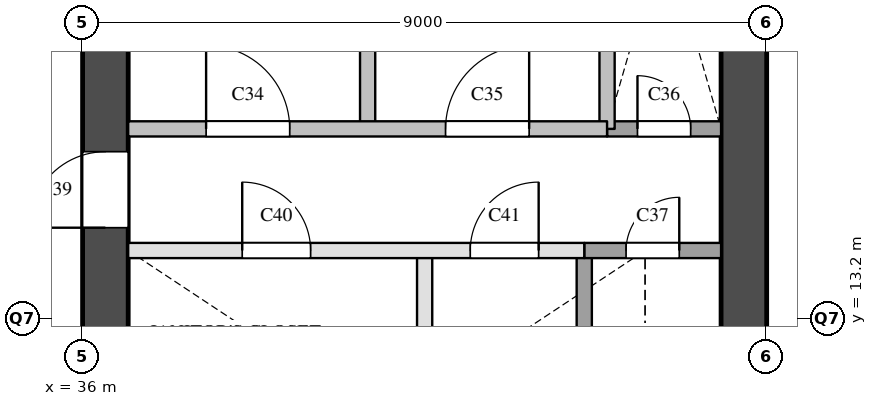
"""IFC4 building model, lengths in metres.
Left out: names, types, materials, properties, quantities, classifications, styles, units other than length and angle.
Written with IfcOpenShell. Run it as: python <this file> out.ifc"""

import sys

from ifc_helpers import new_model, si_unit, direction, frame, frame_2d, origin, place, context, subcontext, project, spatial, rectangle, extrude, element, fill, save


model = new_model("IFC4")
c1 = context("Model", 3, precision=1e-05, world=origin(), true_north=direction((0.0, 1.0)))
c2 = subcontext(c1, "Body", "Model", "MODEL_VIEW")
j1 = project(units=[si_unit("LENGTHUNIT", "METRE"), si_unit("PLANEANGLEUNIT", "RADIAN")], contexts=[c1])
p1 = place(None, origin())
s1 = spatial("IfcSite", under=j1, at=p1, CompositionType="ELEMENT")
p2 = place(p1, origin())
s2 = spatial("IfcBuilding", under=s1, at=p2, CompositionType="ELEMENT")
p3 = place(p2, frame((0.0, 0.0, 112.0)))
s3 = spatial("IfcBuildingStorey", under=s2, at=p3, CompositionType="ELEMENT", Elevation=112.0)
p4 = place(p3, frame((36.3, 9.6, 0.0), z_axis=(0.0, 0.0, 1.0), x_axis=(0.0, 1.0, 0.0)))
e1 = element("IfcWall", 1, at=p4, inside=s3, PredefinedType="SHEAR", context=c2, shape_type="SweptSolid", body=[
    extrude(rectangle(XDim=12.3, YDim=0.6, at=frame_2d((6.15, 0.0))), origin(), (0.0, 0.0, 1.0), 3.5),
])
p5 = place(p4, frame((0.525, 0.0, 0.0)))
e2 = element("IfcOpeningElement", 2, at=p5, cuts=e1, PredefinedType="OPENING", context=c2, shape_type="SweptSolid", body=[
    extrude(rectangle(XDim=1.2, YDim=2.1, at=frame_2d((0.6, 1.05))), frame((0.0, 0.31, 0.0), z_axis=(0.0, -1.0, 0.0), x_axis=(1.0, 0.0, 0.0)), (0.0, 0.0, 1.0), 0.62),
])
p6 = place(p4, frame((4.8, 0.0, 0.0)))
e3 = element("IfcOpeningElement", 3, at=p6, cuts=e1, PredefinedType="OPENING", context=c2, shape_type="SweptSolid", body=[
    extrude(rectangle(XDim=1.0, YDim=2.1, at=frame_2d((0.5, 1.05))), frame((0.0, 0.31, 0.0), z_axis=(0.0, -1.0, 0.0), x_axis=(1.0, 0.0, 0.0)), (0.0, 0.0, 1.0), 0.62),
])
p7 = place(p3, frame((44.7, 9.6, 0.0), z_axis=(0.0, 0.0, 1.0), x_axis=(0.0, 1.0, 0.0)))
e4 = element("IfcWall", 4, at=p7, inside=s3, PredefinedType="SHEAR", context=c2, shape_type="SweptSolid", body=[
    extrude(rectangle(XDim=12.3, YDim=0.6, at=frame_2d((6.15, 0.0))), origin(), (0.0, 0.0, 1.0), 3.5),
])
p8 = place(p7, frame((0.8, 0.0, 0.0)))
e5 = element("IfcOpeningElement", 5, at=p8, cuts=e4, PredefinedType="OPENING", context=c2, shape_type="SweptSolid", body=[
    extrude(rectangle(XDim=0.7, YDim=2.1, at=frame_2d((0.35, 1.05))), frame((0.0, 0.31, 0.0), z_axis=(0.0, -1.0, 0.0), x_axis=(1.0, 0.0, 0.0)), (0.0, 0.0, 1.0), 0.62),
])
p9 = place(p3, frame((39.75, 15.7, 0.0), z_axis=(0.0, 0.0, 1.0), x_axis=(0.0, 1.0, 0.0)))
e6 = element("IfcWall", 6, at=p9, inside=s3, PredefinedType="SOLIDWALL", context=c2, shape_type="SweptSolid", body=[
    extrude(rectangle(XDim=4.3, YDim=0.2, at=frame_2d((2.15, 0.0))), origin(), (0.0, 0.0, 1.0), 3.5),
])
p10 = place(p3, frame((40.5, 11.9, 0.0), z_axis=(0.0, 0.0, 1.0), x_axis=(0.0, 1.0, 0.0)))
e7 = element("IfcWall", 7, at=p10, inside=s3, PredefinedType="PARTITIONING", context=c2, shape_type="SweptSolid", body=[
    extrude(rectangle(XDim=2.2, YDim=0.2, at=frame_2d((1.1, 0.0))), origin(), (0.0, 0.0, 1.0), 3.5),
])
p11 = place(p3, frame((42.6, 11.9, 0.0), z_axis=(0.0, 0.0, 1.0), x_axis=(0.0, 1.0, 0.0)))
e8 = element("IfcWall", 8, at=p11, inside=s3, PredefinedType="SOLIDWALL", context=c2, shape_type="SweptSolid", body=[
    extrude(rectangle(XDim=2.2, YDim=0.2, at=frame_2d((1.1, 0.0))), origin(), (0.0, 0.0, 1.0), 3.5),
])
p12 = place(p3, frame((42.9, 15.7, 0.0), z_axis=(0.0, 0.0, 1.0), x_axis=(0.0, 1.0, 0.0)))
e9 = element("IfcWall", 9, at=p12, inside=s3, PredefinedType="SOLIDWALL", context=c2, shape_type="SweptSolid", body=[
    extrude(rectangle(XDim=4.3, YDim=0.2, at=frame_2d((2.15, 0.0))), origin(), (0.0, 0.0, 1.0), 3.5),
])
p13 = place(p3, frame((36.6, 14.1, 0.0), z_axis=(0.0, 0.0, 1.0), x_axis=(1.0, 0.0, 0.0)))
e10 = element("IfcWall", 10, at=p13, inside=s3, PredefinedType="PARTITIONING", context=c2, shape_type="SweptSolid", body=[
    extrude(rectangle(XDim=6.0, YDim=0.2, at=frame_2d((3.0, 0.0))), origin(), (0.0, 0.0, 1.0), 3.5),
])
p14 = place(p13, frame((1.5, 0.0, 0.0)))
e11 = element("IfcOpeningElement", 11, at=p14, cuts=e10, PredefinedType="OPENING", context=c2, shape_type="SweptSolid", body=[
    extrude(rectangle(XDim=0.9, YDim=2.1, at=frame_2d((0.45, 1.05))), frame((0.0, 0.11, 0.0), z_axis=(0.0, -1.0, 0.0), x_axis=(1.0, 0.0, 0.0)), (0.0, 0.0, 1.0), 0.22),
])
p15 = place(p13, frame((4.5, 0.0, 0.0)))
e12 = element("IfcOpeningElement", 12, at=p15, cuts=e10, PredefinedType="OPENING", context=c2, shape_type="SweptSolid", body=[
    extrude(rectangle(XDim=0.9, YDim=2.1, at=frame_2d((0.45, 1.05))), frame((0.0, 0.11, 0.0), z_axis=(0.0, -1.0, 0.0), x_axis=(1.0, 0.0, 0.0)), (0.0, 0.0, 1.0), 0.22),
])
p16 = place(p3, frame((42.6, 14.1, 0.0), z_axis=(0.0, 0.0, 1.0), x_axis=(1.0, 0.0, 0.0)))
e13 = element("IfcWall", 13, at=p16, inside=s3, PredefinedType="SOLIDWALL", context=c2, shape_type="SweptSolid", body=[
    extrude(rectangle(XDim=1.8, YDim=0.2, at=frame_2d((0.9, 0.0))), origin(), (0.0, 0.0, 1.0), 3.5),
])
p17 = place(p16, frame((0.55, 0.0, 0.0)))
e14 = element("IfcOpeningElement", 14, at=p17, cuts=e13, PredefinedType="OPENING", context=c2, shape_type="SweptSolid", body=[
    extrude(rectangle(XDim=0.7, YDim=2.1, at=frame_2d((0.35, 1.05))), frame((0.0, 0.11, 0.0), z_axis=(0.0, -1.0, 0.0), x_axis=(1.0, 0.0, 0.0)), (0.0, 0.0, 1.0), 0.22),
])
p18 = place(p3, frame((42.9, 15.7, 0.0), z_axis=(0.0, 0.0, 1.0), x_axis=(1.0, 0.0, 0.0)))
e15 = element("IfcWall", 15, at=p18, inside=s3, PredefinedType="SOLIDWALL", context=c2, shape_type="SweptSolid", body=[
    extrude(rectangle(XDim=1.5, YDim=0.2, at=frame_2d((0.75, 0.0))), origin(), (0.0, 0.0, 1.0), 3.5),
])
p19 = place(p18, frame((0.4, 0.0, 0.0)))
e16 = element("IfcOpeningElement", 16, at=p19, cuts=e15, PredefinedType="OPENING", context=c2, shape_type="SweptSolid", body=[
    extrude(rectangle(XDim=0.7, YDim=2.1, at=frame_2d((0.35, 1.05))), frame((0.0, 0.11, 0.0), z_axis=(0.0, -1.0, 0.0), x_axis=(1.0, 0.0, 0.0)), (0.0, 0.0, 1.0), 0.22),
])
p20 = place(p3, frame((36.6, 15.7, 0.0), z_axis=(0.0, 0.0, 1.0), x_axis=(1.0, 0.0, 0.0)))
e17 = element("IfcWall", 17, at=p20, inside=s3, PredefinedType="SOLIDWALL", context=c2, shape_type="SweptSolid", body=[
    extrude(rectangle(XDim=6.3, YDim=0.2, at=frame_2d((3.15, 0.0))), origin(), (0.0, 0.0, 1.0), 3.5),
])
p21 = place(p20, frame((1.025, 0.0, 0.0)))
e18 = element("IfcOpeningElement", 18, at=p21, cuts=e17, PredefinedType="OPENING", context=c2, shape_type="SweptSolid", body=[
    extrude(rectangle(XDim=1.1, YDim=2.1, at=frame_2d((0.55, 1.05))), frame((0.0, 0.11, 0.0), z_axis=(0.0, -1.0, 0.0), x_axis=(1.0, 0.0, 0.0)), (0.0, 0.0, 1.0), 0.22),
])
p22 = place(p20, frame((4.175, 0.0, 0.0)))
e19 = element("IfcOpeningElement", 19, at=p22, cuts=e17, PredefinedType="OPENING", context=c2, shape_type="SweptSolid", body=[
    extrude(rectangle(XDim=1.1, YDim=2.1, at=frame_2d((0.55, 1.05))), frame((0.0, 0.11, 0.0), z_axis=(0.0, -1.0, 0.0), x_axis=(1.0, 0.0, 0.0)), (0.0, 0.0, 1.0), 0.22),
])
p23 = place(p21, origin())
e20 = element("IfcDoor", 20, at=p23, inside=s3, OperationType="SINGLE_SWING_LEFT", PredefinedType="DOOR", context=c2, shape_type="SweptSolid", body=[
    extrude(rectangle(XDim=1.1, YDim=2.1, at=frame_2d((0.55, 1.05))), frame((0.0, 0.025, 0.0), z_axis=(0.0, -1.0, 0.0), x_axis=(1.0, 0.0, 0.0)), (0.0, 0.0, 1.0), 0.05),
])
fill(e18, e20)
p24 = place(p22, origin())
e21 = element("IfcDoor", 21, at=p24, inside=s3, OperationType="SINGLE_SWING_RIGHT", PredefinedType="DOOR", context=c2, shape_type="SweptSolid", body=[
    extrude(rectangle(XDim=1.1, YDim=2.1, at=frame_2d((0.55, 1.05))), frame((0.0, 0.025, 0.0), z_axis=(0.0, -1.0, 0.0), x_axis=(1.0, 0.0, 0.0)), (0.0, 0.0, 1.0), 0.05),
])
fill(e19, e21)
p25 = place(p19, origin())
e22 = element("IfcDoor", 22, at=p25, inside=s3, OperationType="SINGLE_SWING_LEFT", PredefinedType="DOOR", context=c2, shape_type="SweptSolid", body=[
    extrude(rectangle(XDim=0.7, YDim=2.1, at=frame_2d((0.35, 1.05))), frame((0.0, 0.025, 0.0), z_axis=(0.0, -1.0, 0.0), x_axis=(1.0, 0.0, 0.0)), (0.0, 0.0, 1.0), 0.05),
])
fill(e16, e22)
p26 = place(p17, origin())
e23 = element("IfcDoor", 23, at=p26, inside=s3, OperationType="SINGLE_SWING_RIGHT", PredefinedType="DOOR", context=c2, shape_type="SweptSolid", body=[
    extrude(rectangle(XDim=0.7, YDim=2.1, at=frame_2d((0.35, 1.05))), frame((0.0, 0.025, 0.0), z_axis=(0.0, -1.0, 0.0), x_axis=(1.0, 0.0, 0.0)), (0.0, 0.0, 1.0), 0.05),
])
fill(e14, e23)
p27 = place(p6, origin())
e24 = element("IfcDoor", 24, at=p27, inside=s3, OperationType="SINGLE_SWING_LEFT", PredefinedType="DOOR", context=c2, shape_type="SweptSolid", body=[
    extrude(rectangle(XDim=1.0, YDim=2.1, at=frame_2d((0.5, 1.05))), frame((0.0, 0.025, 0.0), z_axis=(0.0, -1.0, 0.0), x_axis=(1.0, 0.0, 0.0)), (0.0, 0.0, 1.0), 0.05),
])
fill(e3, e24)
p28 = place(p14, origin())
e25 = element("IfcDoor", 25, at=p28, inside=s3, OperationType="SINGLE_SWING_LEFT", PredefinedType="DOOR", context=c2, shape_type="SweptSolid", body=[
    extrude(rectangle(XDim=0.9, YDim=2.1, at=frame_2d((0.45, 1.05))), frame((0.0, 0.025, 0.0), z_axis=(0.0, -1.0, 0.0), x_axis=(1.0, 0.0, 0.0)), (0.0, 0.0, 1.0), 0.05),
])
fill(e11, e25)
p29 = place(p15, origin())
e26 = element("IfcDoor", 26, at=p29, inside=s3, OperationType="SINGLE_SWING_RIGHT", PredefinedType="DOOR", context=c2, shape_type="SweptSolid", body=[
    extrude(rectangle(XDim=0.9, YDim=2.1, at=frame_2d((0.45, 1.05))), frame((0.0, 0.025, 0.0), z_axis=(0.0, -1.0, 0.0), x_axis=(1.0, 0.0, 0.0)), (0.0, 0.0, 1.0), 0.05),
])
fill(e12, e26)
save(model, sys.argv[1])
